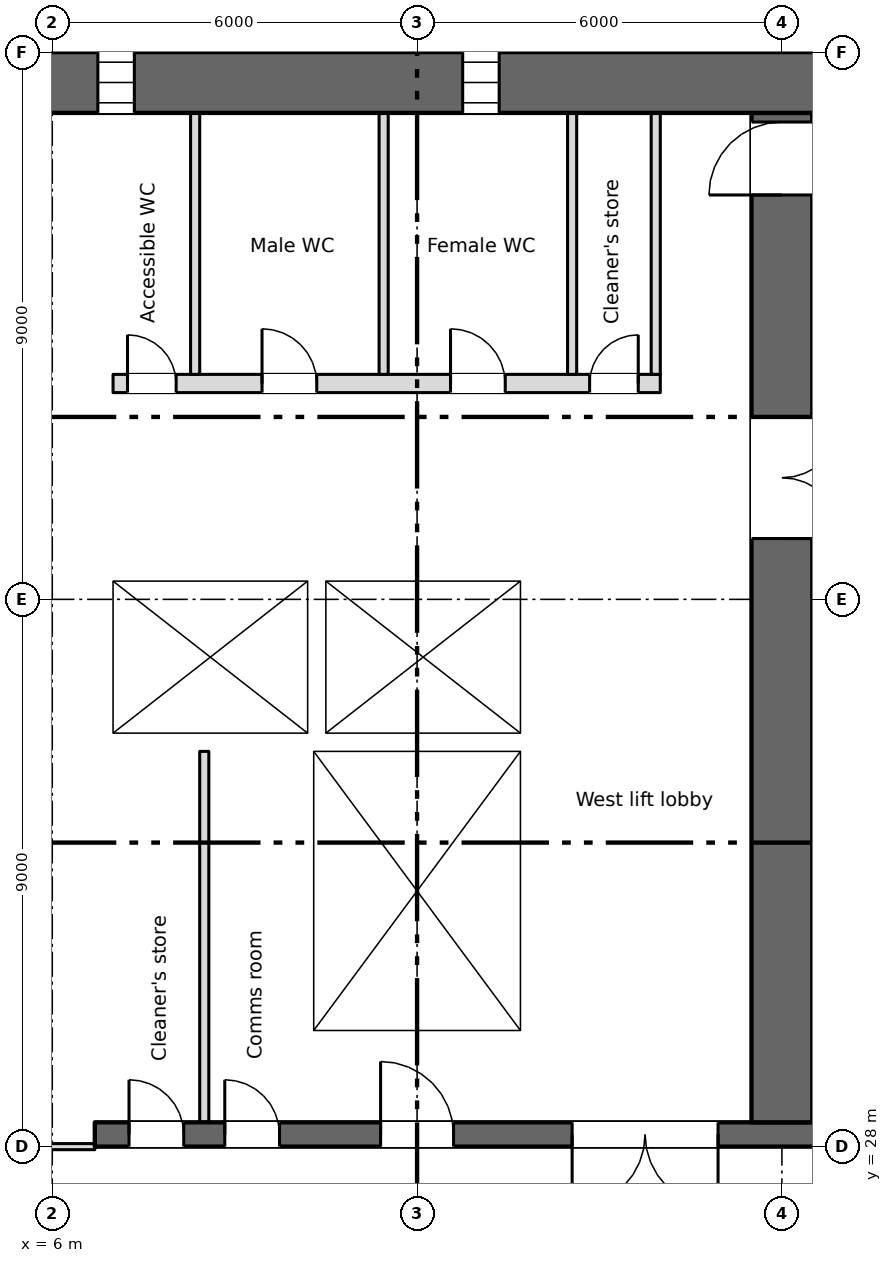
"""IFC4 building model, lengths in metres.
Left out: names, types, materials, properties, quantities, classifications, styles, units other than length and angle.
Written with IfcOpenShell. Run it as: python <this file> out.ifc"""

import sys

from ifc_helpers import new_model, si_unit, direction, frame, frame_2d, origin, place, context, subcontext, project, spatial, rectangle, extrude, element, fill, save


model = new_model("IFC4")
c1 = context("Model", 3, precision=1e-05, world=origin(), true_north=direction((0.0, 1.0)))
c2 = subcontext(c1, "Body", "Model", "MODEL_VIEW")
j1 = project(units=[si_unit("LENGTHUNIT", "METRE"), si_unit("PLANEANGLEUNIT", "RADIAN")], contexts=[c1])
p1 = place(None, origin())
s1 = spatial("IfcSite", under=j1, at=p1, CompositionType="ELEMENT")
p2 = place(p1, origin())
s2 = spatial("IfcBuilding", under=s1, at=p2, CompositionType="ELEMENT")
p3 = place(p2, frame((0.0, 0.0, 63.75)))
s3 = spatial("IfcBuildingStorey", under=s2, at=p3, CompositionType="ELEMENT", Elevation=63.75)
p4 = place(p3, frame((5.55, 45.5, 0.0), z_axis=(0.0, 0.0, 1.0), x_axis=(1.0, 0.0, 0.0)))
e1 = element("IfcWall", 1, at=p4, inside=s3, PredefinedType="SHEAR", context=c2, shape_type="SweptSolid", body=[
    extrude(rectangle(XDim=66.9, YDim=1.0, at=frame_2d((33.45, 0.0))), origin(), (0.0, 0.0, 1.0), 3.35),
])
p5 = place(p4, frame((1.2, 0.0, 0.6)))
e2 = element("IfcOpeningElement", 2, at=p5, cuts=e1, PredefinedType="OPENING", context=c2, shape_type="SweptSolid", body=[
    extrude(rectangle(XDim=0.6, YDim=2.4, at=frame_2d((0.3, 1.2))), frame((0.0, 0.51, 0.0), z_axis=(0.0, -1.0, 0.0), x_axis=(1.0, 0.0, 0.0)), (0.0, 0.0, 1.0), 1.02),
])
p6 = place(p4, frame((7.2, 0.0, 0.6)))
e3 = element("IfcOpeningElement", 3, at=p6, cuts=e1, PredefinedType="OPENING", context=c2, shape_type="SweptSolid", body=[
    extrude(rectangle(XDim=0.6, YDim=2.4, at=frame_2d((0.3, 1.2))), frame((0.0, 0.51, 0.0), z_axis=(0.0, -1.0, 0.0), x_axis=(1.0, 0.0, 0.0)), (0.0, 0.0, 1.0), 1.02),
])
p7 = place(p4, frame((61.2, 0.0, 0.6)))
e4 = element("IfcOpeningElement", 4, at=p7, cuts=e1, PredefinedType="OPENING", context=c2, shape_type="SweptSolid", body=[
    extrude(rectangle(XDim=0.6, YDim=2.4, at=frame_2d((0.3, 1.2))), frame((0.0, 0.51, 0.0), z_axis=(0.0, -1.0, 0.0), x_axis=(1.0, 0.0, 0.0)), (0.0, 0.0, 1.0), 1.02),
])
p8 = place(p3, frame((6.7, 28.2, 0.0), z_axis=(0.0, 0.0, 1.0), x_axis=(1.0, 0.0, 0.0)))
e5 = element("IfcWall", 5, at=p8, inside=s3, PredefinedType="SHEAR", context=c2, shape_type="SweptSolid", body=[
    extrude(rectangle(XDim=57.8, YDim=0.4, at=frame_2d((28.9, 0.0))), origin(), (0.0, 0.0, 1.0), 3.35),
])
p9 = place(p8, frame((12.562, 0.0, 0.0)))
e6 = element("IfcOpeningElement", 6, at=p9, cuts=e5, PredefinedType="OPENING", context=c2, shape_type="SweptSolid", body=[
    extrude(rectangle(XDim=0.9, YDim=2.1, at=frame_2d((0.45, 1.05))), frame((0.0, 0.21, 0.0), z_axis=(0.0, -1.0, 0.0), x_axis=(1.0, 0.0, 0.0)), (0.0, 0.0, 1.0), 0.42),
])
p10 = place(p8, frame((15.137, 0.0, 0.0)))
e7 = element("IfcOpeningElement", 7, at=p10, cuts=e5, PredefinedType="OPENING", context=c2, shape_type="SweptSolid", body=[
    extrude(rectangle(XDim=0.9, YDim=2.1, at=frame_2d((0.45, 1.05))), frame((0.0, 0.21, 0.0), z_axis=(0.0, -1.0, 0.0), x_axis=(1.0, 0.0, 0.0)), (0.0, 0.0, 1.0), 0.42),
])
p11 = place(p8, frame((49.85, 0.0, 0.0)))
e8 = element("IfcOpeningElement", 8, at=p11, cuts=e5, PredefinedType="OPENING", context=c2, shape_type="SweptSolid", body=[
    extrude(rectangle(XDim=0.9, YDim=2.1, at=frame_2d((0.45, 1.05))), frame((0.0, 0.21, 0.0), z_axis=(0.0, -1.0, 0.0), x_axis=(1.0, 0.0, 0.0)), (0.0, 0.0, 1.0), 0.42),
])
p12 = place(p8, frame((0.562, 0.0, 0.0)))
e9 = element("IfcOpeningElement", 9, at=p12, cuts=e5, PredefinedType="OPENING", context=c2, shape_type="SweptSolid", body=[
    extrude(rectangle(XDim=0.9, YDim=2.1, at=frame_2d((0.45, 1.05))), frame((0.0, 0.21, 0.0), z_axis=(0.0, -1.0, 0.0), x_axis=(1.0, 0.0, 0.0)), (0.0, 0.0, 1.0), 0.42),
])
p13 = place(p8, frame((2.137, 0.0, 0.0)))
e10 = element("IfcOpeningElement", 10, at=p13, cuts=e5, PredefinedType="OPENING", context=c2, shape_type="SweptSolid", body=[
    extrude(rectangle(XDim=0.9, YDim=2.1, at=frame_2d((0.45, 1.05))), frame((0.0, 0.21, 0.0), z_axis=(0.0, -1.0, 0.0), x_axis=(1.0, 0.0, 0.0)), (0.0, 0.0, 1.0), 0.42),
])
p14 = place(p8, frame((4.7, 0.0, 0.0)))
e11 = element("IfcOpeningElement", 11, at=p14, cuts=e5, PredefinedType="OPENING", context=c2, shape_type="SweptSolid", body=[
    extrude(rectangle(XDim=1.2, YDim=2.1, at=frame_2d((0.6, 1.05))), frame((0.0, 0.21, 0.0), z_axis=(0.0, -1.0, 0.0), x_axis=(1.0, 0.0, 0.0)), (0.0, 0.0, 1.0), 0.42),
])
p15 = place(p8, frame((31.7, 0.0, 0.0)))
e12 = element("IfcOpeningElement", 12, at=p15, cuts=e5, PredefinedType="OPENING", context=c2, shape_type="SweptSolid", body=[
    extrude(rectangle(XDim=1.2, YDim=2.1, at=frame_2d((0.6, 1.05))), frame((0.0, 0.21, 0.0), z_axis=(0.0, -1.0, 0.0), x_axis=(1.0, 0.0, 0.0)), (0.0, 0.0, 1.0), 0.42),
])
p16 = place(p8, frame((55.2, 0.0, 0.0)))
e13 = element("IfcOpeningElement", 13, at=p16, cuts=e5, PredefinedType="OPENING", context=c2, shape_type="SweptSolid", body=[
    extrude(rectangle(XDim=1.2, YDim=2.1, at=frame_2d((0.6, 1.05))), frame((0.0, 0.21, 0.0), z_axis=(0.0, -1.0, 0.0), x_axis=(1.0, 0.0, 0.0)), (0.0, 0.0, 1.0), 0.42),
])
p17 = place(p8, frame((21.7, 0.0, 0.0)))
e14 = element("IfcOpeningElement", 14, at=p17, cuts=e5, PredefinedType="OPENING", context=c2, shape_type="SweptSolid", body=[
    extrude(rectangle(XDim=1.2, YDim=2.1, at=frame_2d((0.6, 1.05))), frame((0.0, 0.21, 0.0), z_axis=(0.0, -1.0, 0.0), x_axis=(1.0, 0.0, 0.0)), (0.0, 0.0, 1.0), 0.42),
])
p18 = place(p8, frame((41.7, 0.0, 0.0)))
e15 = element("IfcOpeningElement", 15, at=p18, cuts=e5, PredefinedType="OPENING", context=c2, shape_type="SweptSolid", body=[
    extrude(rectangle(XDim=1.2, YDim=2.1, at=frame_2d((0.6, 1.05))), frame((0.0, 0.21, 0.0), z_axis=(0.0, -1.0, 0.0), x_axis=(1.0, 0.0, 0.0)), (0.0, 0.0, 1.0), 0.42),
])
p19 = place(p8, frame((24.85, 0.0, 0.0)))
e16 = element("IfcOpeningElement", 16, at=p19, cuts=e5, PredefinedType="OPENING", context=c2, shape_type="SweptSolid", body=[
    extrude(rectangle(XDim=2.4, YDim=2.1, at=frame_2d((1.2, 1.05))), frame((0.0, 0.21, 0.0), z_axis=(0.0, -1.0, 0.0), x_axis=(1.0, 0.0, 0.0)), (0.0, 0.0, 1.0), 0.42),
])
p20 = place(p8, frame((37.35, 0.0, 0.0)))
e17 = element("IfcOpeningElement", 17, at=p20, cuts=e5, PredefinedType="OPENING", context=c2, shape_type="SweptSolid", body=[
    extrude(rectangle(XDim=2.4, YDim=2.1, at=frame_2d((1.2, 1.05))), frame((0.0, 0.21, 0.0), z_axis=(0.0, -1.0, 0.0), x_axis=(1.0, 0.0, 0.0)), (0.0, 0.0, 1.0), 0.42),
])
p21 = place(p8, frame((7.85, 0.0, 0.0)))
e18 = element("IfcOpeningElement", 18, at=p21, cuts=e5, PredefinedType="OPENING", context=c2, shape_type="SweptSolid", body=[
    extrude(rectangle(XDim=2.4, YDim=2.1, at=frame_2d((1.2, 1.05))), frame((0.0, 0.21, 0.0), z_axis=(0.0, -1.0, 0.0), x_axis=(1.0, 0.0, 0.0)), (0.0, 0.0, 1.0), 0.42),
])
p22 = place(p8, frame((28.85, 0.0, 0.0)))
e19 = element("IfcOpeningElement", 19, at=p22, cuts=e5, PredefinedType="OPENING", context=c2, shape_type="SweptSolid", body=[
    extrude(rectangle(XDim=0.9, YDim=2.1, at=frame_2d((0.45, 1.05))), frame((0.0, 0.21, 0.0), z_axis=(0.0, -1.0, 0.0), x_axis=(1.0, 0.0, 0.0)), (0.0, 0.0, 1.0), 0.42),
])
p23 = place(p8, frame((34.85, 0.0, 0.0)))
e20 = element("IfcOpeningElement", 20, at=p23, cuts=e5, PredefinedType="OPENING", context=c2, shape_type="SweptSolid", body=[
    extrude(rectangle(XDim=0.9, YDim=2.1, at=frame_2d((0.45, 1.05))), frame((0.0, 0.21, 0.0), z_axis=(0.0, -1.0, 0.0), x_axis=(1.0, 0.0, 0.0)), (0.0, 0.0, 1.0), 0.42),
])
p24 = place(p3, frame((6.85, 28.4, 0.0), z_axis=(0.0, 0.0, 1.0), x_axis=(0.0, 1.0, 0.0)))
e21 = element("IfcWall", 21, at=p24, inside=s3, PredefinedType="SHEAR", context=c2, shape_type="SweptSolid", body=[
    extrude(rectangle(XDim=16.6, YDim=0.3, at=frame_2d((8.3, 0.0))), origin(), (0.0, 0.0, 1.0), 3.35),
])
p25 = place(p3, frame((18.0, 28.4, 0.0), z_axis=(0.0, 0.0, 1.0), x_axis=(0.0, 1.0, 0.0)))
e22 = element("IfcWall", 22, at=p25, inside=s3, PredefinedType="SHEAR", context=c2, shape_type="SweptSolid", body=[
    extrude(rectangle(XDim=16.6, YDim=1.0, at=frame_2d((8.3, 0.0))), origin(), (0.0, 0.0, 1.0), 3.35),
])
p26 = place(p25, frame((9.6, 0.0, 0.0)))
e23 = element("IfcOpeningElement", 23, at=p26, cuts=e22, PredefinedType="OPENING", context=c2, shape_type="SweptSolid", body=[
    extrude(rectangle(XDim=2.0, YDim=2.1, at=frame_2d((1.0, 1.05))), frame((0.0, 0.51, 0.0), z_axis=(0.0, -1.0, 0.0), x_axis=(1.0, 0.0, 0.0)), (0.0, 0.0, 1.0), 1.02),
])
p27 = place(p25, frame((15.25, 0.0, 0.0)))
e24 = element("IfcOpeningElement", 24, at=p27, cuts=e22, PredefinedType="OPENING", context=c2, shape_type="SweptSolid", body=[
    extrude(rectangle(XDim=1.2, YDim=2.1, at=frame_2d((0.6, 1.05))), frame((0.0, 0.51, 0.0), z_axis=(0.0, -1.0, 0.0), x_axis=(1.0, 0.0, 0.0)), (0.0, 0.0, 1.0), 1.02),
])
for number, where, z_axis, x_axis in (
    (25, (10.15, 28.4, 0.0), (0.0, 0.0, 1.0), (0.0, 1.0, 0.0)),
    (26, (13.85, 28.4, 0.0), (0.0, 0.0, 1.0), (0.0, 1.0, 0.0)),
):
    element("IfcWall", number, at=place(p3, frame(where, z_axis=z_axis, x_axis=x_axis)), inside=s3, PredefinedType="SHEAR", context=c2, shape_type="SweptSolid", body=[
        extrude(rectangle(XDim=6.1, YDim=0.3, at=frame_2d((3.05, 0.0))), origin(), (0.0, 0.0, 1.0), 3.35),
    ])
for number, where, z_axis, x_axis in (
    (27, (7.0, 34.65, 0.0), (0.0, 0.0, 1.0), (1.0, 0.0, 0.0)),
    (28, (7.0, 37.45, 0.0), (0.0, 0.0, 1.0), (1.0, 0.0, 0.0)),
):
    element("IfcWall", number, at=place(p3, frame(where, z_axis=z_axis, x_axis=x_axis)), inside=s3, PredefinedType="SHEAR", context=c2, shape_type="SweptSolid", body=[
        extrude(rectangle(XDim=7.0, YDim=0.3, at=frame_2d((3.5, 0.0))), origin(), (0.0, 0.0, 1.0), 3.35),
    ])
p28 = place(p3, frame((13.85, 34.8, 0.0), z_axis=(0.0, 0.0, 1.0), x_axis=(0.0, 1.0, 0.0)))
e29 = element("IfcWall", 29, at=p28, inside=s3, PredefinedType="SHEAR", context=c2, shape_type="SweptSolid", body=[
    extrude(rectangle(XDim=2.5, YDim=0.3, at=frame_2d((1.25, 0.0))), origin(), (0.0, 0.0, 1.0), 3.35),
])
p29 = place(p3, frame((7.0, 40.55, 0.0), z_axis=(0.0, 0.0, 1.0), x_axis=(1.0, 0.0, 0.0)))
e30 = element("IfcWall", 30, at=p29, inside=s3, PredefinedType="PARTITIONING", context=c2, shape_type="SweptSolid", body=[
    extrude(rectangle(XDim=9.0, YDim=0.3, at=frame_2d((4.5, 0.0))), origin(), (0.0, 0.0, 1.0), 3.35),
])
p30 = place(p29, frame((0.238, 0.0, 0.0)))
e31 = element("IfcOpeningElement", 31, at=p30, cuts=e30, PredefinedType="OPENING", context=c2, shape_type="SweptSolid", body=[
    extrude(rectangle(XDim=0.8, YDim=2.1, at=frame_2d((0.4, 1.05))), frame((0.0, 0.16, 0.0), z_axis=(0.0, -1.0, 0.0), x_axis=(1.0, 0.0, 0.0)), (0.0, 0.0, 1.0), 0.32),
])
p31 = place(p29, frame((2.45, 0.0, 0.0)))
e32 = element("IfcOpeningElement", 32, at=p31, cuts=e30, PredefinedType="OPENING", context=c2, shape_type="SweptSolid", body=[
    extrude(rectangle(XDim=0.9, YDim=2.1, at=frame_2d((0.45, 1.05))), frame((0.0, 0.16, 0.0), z_axis=(0.0, -1.0, 0.0), x_axis=(1.0, 0.0, 0.0)), (0.0, 0.0, 1.0), 0.32),
])
p32 = place(p29, frame((5.55, 0.0, 0.0)))
e33 = element("IfcOpeningElement", 33, at=p32, cuts=e30, PredefinedType="OPENING", context=c2, shape_type="SweptSolid", body=[
    extrude(rectangle(XDim=0.9, YDim=2.1, at=frame_2d((0.45, 1.05))), frame((0.0, 0.16, 0.0), z_axis=(0.0, -1.0, 0.0), x_axis=(1.0, 0.0, 0.0)), (0.0, 0.0, 1.0), 0.32),
])
p33 = place(p29, frame((7.837, 0.0, 0.0)))
e34 = element("IfcOpeningElement", 34, at=p33, cuts=e30, PredefinedType="OPENING", context=c2, shape_type="SweptSolid", body=[
    extrude(rectangle(XDim=0.8, YDim=2.1, at=frame_2d((0.4, 1.05))), frame((0.0, 0.16, 0.0), z_axis=(0.0, -1.0, 0.0), x_axis=(1.0, 0.0, 0.0)), (0.0, 0.0, 1.0), 0.32),
])
p34 = place(p3, frame((10.35, 34.8, 0.0), z_axis=(0.0, 0.0, 1.0), x_axis=(0.0, 1.0, 0.0)))
e35 = element("IfcWall", 35, at=p34, inside=s3, PredefinedType="SHEAR", context=c2, shape_type="SweptSolid", body=[
    extrude(rectangle(XDim=2.5, YDim=0.3, at=frame_2d((1.25, 0.0))), origin(), (0.0, 0.0, 1.0), 3.35),
])
p35 = place(p3, frame((15.925, 40.7, 0.0), z_axis=(0.0, 0.0, 1.0), x_axis=(0.0, 1.0, 0.0)))
e36 = element("IfcWall", 36, at=p35, inside=s3, PredefinedType="PARTITIONING", context=c2, shape_type="SweptSolid", body=[
    extrude(rectangle(XDim=4.3, YDim=0.15, at=frame_2d((2.15, 0.0))), origin(), (0.0, 0.0, 1.0), 3.35),
])
p36 = place(p3, frame((8.5, 28.4, 0.0), z_axis=(0.0, 0.0, 1.0), x_axis=(0.0, 1.0, 0.0)))
e37 = element("IfcWall", 37, at=p36, inside=s3, PredefinedType="PARTITIONING", context=c2, shape_type="SweptSolid", body=[
    extrude(rectangle(XDim=6.1, YDim=0.15, at=frame_2d((3.05, 0.0))), origin(), (0.0, 0.0, 1.0), 3.35),
])
for number, where, z_axis, x_axis in (
    (38, (8.35, 40.7, 0.0), (0.0, 0.0, 1.0), (0.0, 1.0, 0.0)),
    (39, (11.45, 40.7, 0.0), (0.0, 0.0, 1.0), (0.0, 1.0, 0.0)),
    (40, (14.55, 40.7, 0.0), (0.0, 0.0, 1.0), (0.0, 1.0, 0.0)),
):
    element("IfcWall", number, at=place(p3, frame(where, z_axis=z_axis, x_axis=x_axis)), inside=s3, PredefinedType="PARTITIONING", context=c2, shape_type="SweptSolid", body=[
        extrude(rectangle(XDim=4.3, YDim=0.15, at=frame_2d((2.15, 0.0))), origin(), (0.0, 0.0, 1.0), 3.35),
    ])
p37 = place(p3, frame((0.8, 28.0, 0.0), z_axis=(0.0, 0.0, 1.0), x_axis=(1.0, 0.0, 0.0)))
e41 = element("IfcWall", 41, at=p37, inside=s3, PredefinedType="PARTITIONING", context=c2, shape_type="SweptSolid", body=[
    extrude(rectangle(XDim=5.9, YDim=0.1, at=frame_2d((2.95, 0.0))), origin(), (0.0, 0.0, 1.0), 3.35),
])
p38 = place(p37, frame((2.05, 0.0, 0.0)))
e42 = element("IfcOpeningElement", 42, at=p38, cuts=e41, PredefinedType="OPENING", context=c2, shape_type="SweptSolid", body=[
    extrude(rectangle(XDim=1.8, YDim=2.1, at=frame_2d((0.9, 1.05))), frame((0.0, 0.06, 0.0), z_axis=(0.0, -1.0, 0.0), x_axis=(1.0, 0.0, 0.0)), (0.0, 0.0, 1.0), 0.12),
])
p39 = place(p5, origin())
e43 = element("IfcWindow", 43, at=p39, inside=s3, PartitioningType="SINGLE_PANEL", PredefinedType="WINDOW", context=c2, shape_type="SweptSolid", body=[
    extrude(rectangle(XDim=0.6, YDim=2.4, at=frame_2d((0.3, 1.2))), frame((0.0, 0.03, 0.0), z_axis=(0.0, -1.0, 0.0), x_axis=(1.0, 0.0, 0.0)), (0.0, 0.0, 1.0), 0.06),
])
fill(e2, e43)
p40 = place(p6, origin())
e44 = element("IfcWindow", 44, at=p40, inside=s3, PartitioningType="SINGLE_PANEL", PredefinedType="WINDOW", context=c2, shape_type="SweptSolid", body=[
    extrude(rectangle(XDim=0.6, YDim=2.4, at=frame_2d((0.3, 1.2))), frame((0.0, 0.03, 0.0), z_axis=(0.0, -1.0, 0.0), x_axis=(1.0, 0.0, 0.0)), (0.0, 0.0, 1.0), 0.06),
])
fill(e3, e44)
p41 = place(p12, origin())
e45 = element("IfcDoor", 45, at=p41, inside=s3, OperationType="SINGLE_SWING_LEFT", PredefinedType="DOOR", context=c2, shape_type="SweptSolid", body=[
    extrude(rectangle(XDim=0.9, YDim=2.1, at=frame_2d((0.45, 1.05))), frame((0.0, 0.025, 0.0), z_axis=(0.0, -1.0, 0.0), x_axis=(1.0, 0.0, 0.0)), (0.0, 0.0, 1.0), 0.05),
])
fill(e9, e45)
p42 = place(p13, origin())
e46 = element("IfcDoor", 46, at=p42, inside=s3, OperationType="SINGLE_SWING_LEFT", PredefinedType="DOOR", context=c2, shape_type="SweptSolid", body=[
    extrude(rectangle(XDim=0.9, YDim=2.1, at=frame_2d((0.45, 1.05))), frame((0.0, 0.025, 0.0), z_axis=(0.0, -1.0, 0.0), x_axis=(1.0, 0.0, 0.0)), (0.0, 0.0, 1.0), 0.05),
])
fill(e10, e46)
p43 = place(p30, origin())
e47 = element("IfcDoor", 47, at=p43, inside=s3, OperationType="SINGLE_SWING_LEFT", PredefinedType="DOOR", context=c2, shape_type="SweptSolid", body=[
    extrude(rectangle(XDim=0.8, YDim=2.1, at=frame_2d((0.4, 1.05))), frame((0.0, 0.025, 0.0), z_axis=(0.0, -1.0, 0.0), x_axis=(1.0, 0.0, 0.0)), (0.0, 0.0, 1.0), 0.05),
])
fill(e31, e47)
p44 = place(p31, origin())
e48 = element("IfcDoor", 48, at=p44, inside=s3, OperationType="SINGLE_SWING_LEFT", PredefinedType="DOOR", context=c2, shape_type="SweptSolid", body=[
    extrude(rectangle(XDim=0.9, YDim=2.1, at=frame_2d((0.45, 1.05))), frame((0.0, 0.025, 0.0), z_axis=(0.0, -1.0, 0.0), x_axis=(1.0, 0.0, 0.0)), (0.0, 0.0, 1.0), 0.05),
])
fill(e32, e48)
p45 = place(p32, origin())
e49 = element("IfcDoor", 49, at=p45, inside=s3, OperationType="SINGLE_SWING_LEFT", PredefinedType="DOOR", context=c2, shape_type="SweptSolid", body=[
    extrude(rectangle(XDim=0.9, YDim=2.1, at=frame_2d((0.45, 1.05))), frame((0.0, 0.025, 0.0), z_axis=(0.0, -1.0, 0.0), x_axis=(1.0, 0.0, 0.0)), (0.0, 0.0, 1.0), 0.05),
])
fill(e33, e49)
p46 = place(p33, origin())
e50 = element("IfcDoor", 50, at=p46, inside=s3, OperationType="SINGLE_SWING_RIGHT", PredefinedType="DOOR", context=c2, shape_type="SweptSolid", body=[
    extrude(rectangle(XDim=0.8, YDim=2.1, at=frame_2d((0.4, 1.05))), frame((0.0, 0.025, 0.0), z_axis=(0.0, -1.0, 0.0), x_axis=(1.0, 0.0, 0.0)), (0.0, 0.0, 1.0), 0.05),
])
fill(e34, e50)
p47 = place(p14, origin())
e51 = element("IfcDoor", 51, at=p47, inside=s3, OperationType="SINGLE_SWING_LEFT", PredefinedType="DOOR", context=c2, shape_type="SweptSolid", body=[
    extrude(rectangle(XDim=1.2, YDim=2.1, at=frame_2d((0.6, 1.05))), frame((0.0, 0.025, 0.0), z_axis=(0.0, -1.0, 0.0), x_axis=(1.0, 0.0, 0.0)), (0.0, 0.0, 1.0), 0.05),
])
fill(e11, e51)
p48 = place(p21, origin())
e52 = element("IfcDoor", 52, at=p48, inside=s3, OperationType="DOUBLE_DOOR_SINGLE_SWING", PredefinedType="DOOR", context=c2, shape_type="SweptSolid", body=[
    extrude(rectangle(XDim=2.4, YDim=2.1, at=frame_2d((1.2, 1.05))), frame((0.0, 0.025, 0.0), z_axis=(0.0, -1.0, 0.0), x_axis=(1.0, 0.0, 0.0)), (0.0, 0.0, 1.0), 0.05),
])
fill(e18, e52)
p49 = place(p26, origin())
e53 = element("IfcDoor", 53, at=p49, inside=s3, OperationType="DOUBLE_DOOR_SINGLE_SWING", PredefinedType="DOOR", context=c2, shape_type="SweptSolid", body=[
    extrude(rectangle(XDim=2.0, YDim=2.1, at=frame_2d((1.0, 1.05))), frame((0.0, 0.025, 0.0), z_axis=(0.0, -1.0, 0.0), x_axis=(1.0, 0.0, 0.0)), (0.0, 0.0, 1.0), 0.05),
])
fill(e23, e53)
p50 = place(p27, origin())
e54 = element("IfcDoor", 54, at=p50, inside=s3, OperationType="SINGLE_SWING_LEFT", PredefinedType="DOOR", context=c2, shape_type="SweptSolid", body=[
    extrude(rectangle(XDim=1.2, YDim=2.1, at=frame_2d((0.6, 1.05))), frame((0.0, 0.025, 0.0), z_axis=(0.0, -1.0, 0.0), x_axis=(1.0, 0.0, 0.0)), (0.0, 0.0, 1.0), 0.05),
])
fill(e24, e54)
save(model, sys.argv[1])
